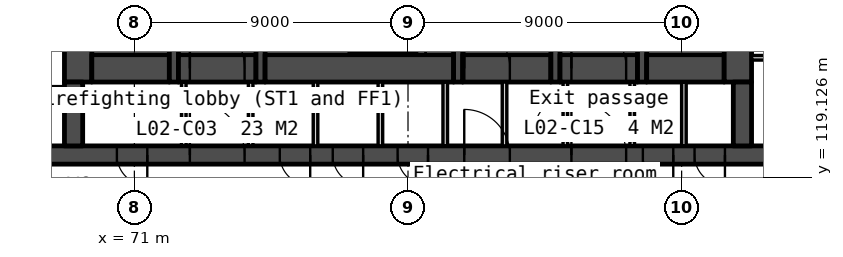
"""IFC4 building model, lengths in metres.
Left out: names, types, materials, properties, quantities, classifications, styles, units other than length and angle.
Written with IfcOpenShell. Run it as: python <this file> out.ifc"""

import sys

from ifc_helpers import new_model, si_unit, direction, frame, frame_2d, origin, place, context, subcontext, project, spatial, rectangle, extrude, element, fill, save


model = new_model("IFC4")
c1 = context("Model", 3, precision=1e-05, world=origin(), true_north=direction((0.0, 1.0)))
c2 = subcontext(c1, "Body", "Model", "MODEL_VIEW")
j1 = project(units=[si_unit("LENGTHUNIT", "METRE"), si_unit("PLANEANGLEUNIT", "RADIAN")], contexts=[c1])
p1 = place(None, origin())
s1 = spatial("IfcSite", under=j1, at=p1, CompositionType="ELEMENT")
p2 = place(p1, origin())
s2 = spatial("IfcBuilding", under=s1, at=p2, CompositionType="ELEMENT")
p3 = place(p2, frame((0.0, 0.0, 13.5)))
s3 = spatial("IfcBuildingStorey", under=s2, at=p3, CompositionType="ELEMENT", Elevation=13.5)
p4 = place(p3, frame((66.0, 119.85, 0.0), z_axis=(0.0, 0.0, 1.0), x_axis=(1.0, 0.0, 0.0)))
e1 = element("IfcWall", 1, at=p4, inside=s3, PredefinedType="SOLIDWALL", context=c2, shape_type="SweptSolid", body=[
    extrude(rectangle(XDim=28.0, YDim=0.6, at=frame_2d((14.0, 0.0))), origin(), (0.0, 0.0, 1.0), 5.75),
])
p5 = place(p4, frame((6.825, 0.0, 0.0)))
e2 = element("IfcOpeningElement", 2, at=p5, cuts=e1, PredefinedType="OPENING", context=c2, shape_type="SweptSolid", body=[
    extrude(rectangle(XDim=1.8, YDim=2.1, at=frame_2d((0.9, 1.05))), frame((0.0, 0.31, 0.0), z_axis=(0.0, -1.0, 0.0), x_axis=(1.0, 0.0, 0.0)), (0.0, 0.0, 1.0), 0.62),
])
p6 = place(p4, frame((15.85, 0.0, 0.0)))
e3 = element("IfcOpeningElement", 3, at=p6, cuts=e1, PredefinedType="OPENING", context=c2, shape_type="SweptSolid", body=[
    extrude(rectangle(XDim=1.5, YDim=2.1, at=frame_2d((0.75, 1.05))), frame((0.0, 0.31, 0.0), z_axis=(0.0, -1.0, 0.0), x_axis=(1.0, 0.0, 0.0)), (0.0, 0.0, 1.0), 0.62),
])
p7 = place(p4, frame((19.375, 0.0, 0.0)))
e4 = element("IfcOpeningElement", 4, at=p7, cuts=e1, PredefinedType="OPENING", context=c2, shape_type="SweptSolid", body=[
    extrude(rectangle(XDim=1.8, YDim=2.1, at=frame_2d((0.9, 1.05))), frame((0.0, 0.31, 0.0), z_axis=(0.0, -1.0, 0.0), x_axis=(1.0, 0.0, 0.0)), (0.0, 0.0, 1.0), 0.62),
])
p8 = place(p4, frame((4.425, 0.0, 0.0)))
e5 = element("IfcOpeningElement", 5, at=p8, cuts=e1, PredefinedType="OPENING", context=c2, shape_type="SweptSolid", body=[
    extrude(rectangle(XDim=1.0, YDim=2.1, at=frame_2d((0.5, 1.05))), frame((0.0, 0.31, 0.0), z_axis=(0.0, -1.0, 0.0), x_axis=(1.0, 0.0, 0.0)), (0.0, 0.0, 1.0), 0.62),
])
p9 = place(p4, frame((9.783, 0.0, 0.0)))
e6 = element("IfcOpeningElement", 6, at=p9, cuts=e1, PredefinedType="OPENING", context=c2, shape_type="SweptSolid", body=[
    extrude(rectangle(XDim=1.0, YDim=2.1, at=frame_2d((0.5, 1.05))), frame((0.0, 0.31, 0.0), z_axis=(0.0, -1.0, 0.0), x_axis=(1.0, 0.0, 0.0)), (0.0, 0.0, 1.0), 0.62),
])
p10 = place(p4, frame((11.525, 0.0, 0.0)))
e7 = element("IfcOpeningElement", 7, at=p10, cuts=e1, PredefinedType="OPENING", context=c2, shape_type="SweptSolid", body=[
    extrude(rectangle(XDim=1.0, YDim=2.1, at=frame_2d((0.5, 1.05))), frame((0.0, 0.31, 0.0), z_axis=(0.0, -1.0, 0.0), x_axis=(1.0, 0.0, 0.0)), (0.0, 0.0, 1.0), 0.62),
])
p11 = place(p4, frame((13.658, 0.0, 0.0)))
e8 = element("IfcOpeningElement", 8, at=p11, cuts=e1, PredefinedType="OPENING", context=c2, shape_type="SweptSolid", body=[
    extrude(rectangle(XDim=1.0, YDim=2.1, at=frame_2d((0.5, 1.05))), frame((0.0, 0.31, 0.0), z_axis=(0.0, -1.0, 0.0), x_axis=(1.0, 0.0, 0.0)), (0.0, 0.0, 1.0), 0.62),
])
p12 = place(p4, frame((21.725, 0.0, 0.0)))
e9 = element("IfcOpeningElement", 9, at=p12, cuts=e1, PredefinedType="OPENING", context=c2, shape_type="SweptSolid", body=[
    extrude(rectangle(XDim=1.0, YDim=2.1, at=frame_2d((0.5, 1.05))), frame((0.0, 0.31, 0.0), z_axis=(0.0, -1.0, 0.0), x_axis=(1.0, 0.0, 0.0)), (0.0, 0.0, 1.0), 0.62),
])
p13 = place(p4, frame((23.425, 0.0, 0.0)))
e10 = element("IfcOpeningElement", 10, at=p13, cuts=e1, PredefinedType="OPENING", context=c2, shape_type="SweptSolid", body=[
    extrude(rectangle(XDim=1.0, YDim=2.1, at=frame_2d((0.5, 1.05))), frame((0.0, 0.31, 0.0), z_axis=(0.0, -1.0, 0.0), x_axis=(1.0, 0.0, 0.0)), (0.0, 0.0, 1.0), 0.62),
])
p14 = place(p3, frame((66.6, 122.025, 0.0), z_axis=(0.0, 0.0, 1.0), x_axis=(1.0, 0.0, 0.0)))
e11 = element("IfcWall", 11, at=p14, inside=s3, PredefinedType="PARTITIONING", context=c2, shape_type="SweptSolid", body=[
    extrude(rectangle(XDim=2.1, YDim=0.15, at=frame_2d((1.05, 0.0))), origin(), (0.0, 0.0, 1.0), 5.75),
])
p15 = place(p3, frame((69.15, 133.95, 0.0), z_axis=(0.0, 0.0, 1.0), x_axis=(0.0, -1.0, 0.0)))
e12 = element("IfcWall", 12, at=p15, inside=s3, PredefinedType="SOLIDWALL", context=c2, shape_type="SweptSolid", body=[
    extrude(rectangle(XDim=11.7, YDim=0.9, at=frame_2d((5.85, 0.0))), origin(), (0.0, 0.0, 1.0), 5.75),
])
p16 = place(p3, frame((69.0, 122.25, 0.0), z_axis=(0.0, 0.0, 1.0), x_axis=(0.0, -1.0, 0.0)))
e13 = element("IfcWall", 13, at=p16, inside=s3, PredefinedType="SOLIDWALL", context=c2, shape_type="SweptSolid", body=[
    extrude(rectangle(XDim=2.1, YDim=0.6, at=frame_2d((1.05, 0.0))), origin(), (0.0, 0.0, 1.0), 5.75),
])
p17 = place(p3, frame((69.6, 122.7, 0.0), z_axis=(0.0, 0.0, 1.0), x_axis=(1.0, 0.0, 0.0)))
e14 = element("IfcWall", 14, at=p17, inside=s3, PredefinedType="SOLIDWALL", context=c2, shape_type="SweptSolid", body=[
    extrude(rectangle(XDim=2.55, YDim=0.9, at=frame_2d((1.275, 0.0))), origin(), (0.0, 0.0, 1.0), 5.75),
])
p18 = place(p3, frame((72.3, 133.95, 0.0), z_axis=(0.0, 0.0, 1.0), x_axis=(0.0, -1.0, 0.0)))
e15 = element("IfcWall", 15, at=p18, inside=s3, PredefinedType="SOLIDWALL", context=c2, shape_type="SweptSolid", body=[
    extrude(rectangle(XDim=11.7, YDim=0.3, at=frame_2d((5.85, 0.0))), origin(), (0.0, 0.0, 1.0), 5.75),
])
p19 = place(p18, frame((6.95, 0.0, 0.0)))
e16 = element("IfcOpeningElement", 16, at=p19, cuts=e15, PredefinedType="OPENING", context=c2, shape_type="SweptSolid", body=[
    extrude(rectangle(XDim=1.1, YDim=2.1, at=frame_2d((0.55, 1.05))), frame((0.0, 0.16, 0.0), z_axis=(0.0, -1.0, 0.0), x_axis=(1.0, 0.0, 0.0)), (0.0, 0.0, 1.0), 0.32),
])
p20 = place(p18, frame((9.35, 0.0, 0.0)))
e17 = element("IfcOpeningElement", 17, at=p20, cuts=e15, PredefinedType="OPENING", context=c2, shape_type="SweptSolid", body=[
    extrude(rectangle(XDim=0.9, YDim=2.1, at=frame_2d((0.45, 1.05))), frame((0.0, 0.16, 0.0), z_axis=(0.0, -1.0, 0.0), x_axis=(1.0, 0.0, 0.0)), (0.0, 0.0, 1.0), 0.32),
])
p21 = place(p18, frame((5.1, 0.0, 0.0)))
e18 = element("IfcOpeningElement", 18, at=p21, cuts=e15, PredefinedType="OPENING", context=c2, shape_type="SweptSolid", body=[
    extrude(rectangle(XDim=1.0, YDim=2.1, at=frame_2d((0.5, 1.05))), frame((0.0, 0.16, 0.0), z_axis=(0.0, -1.0, 0.0), x_axis=(1.0, 0.0, 0.0)), (0.0, 0.0, 1.0), 0.32),
])
p22 = place(p3, frame((72.45, 122.7, 0.0), z_axis=(0.0, 0.0, 1.0), x_axis=(1.0, 0.0, 0.0)))
e19 = element("IfcWall", 19, at=p22, inside=s3, PredefinedType="SOLIDWALL", context=c2, shape_type="SweptSolid", body=[
    extrude(rectangle(XDim=2.55, YDim=0.9, at=frame_2d((1.275, 0.0))), origin(), (0.0, 0.0, 1.0), 5.75),
])
p23 = place(p22, frame((0.375, 0.0, 0.0)))
e20 = element("IfcOpeningElement", 20, at=p23, cuts=e19, PredefinedType="OPENING", context=c2, shape_type="SweptSolid", body=[
    extrude(rectangle(XDim=1.8, YDim=2.1, at=frame_2d((0.9, 1.05))), frame((0.0, 0.46, 0.0), z_axis=(0.0, -1.0, 0.0), x_axis=(1.0, 0.0, 0.0)), (0.0, 0.0, 1.0), 0.92),
])
for number, where, z_axis, x_axis in (
    (21, (72.625, 122.25, 0.0), (0.0, 0.0, 1.0), (0.0, -1.0, 0.0)),
    (22, (74.825, 122.25, 0.0), (0.0, 0.0, 1.0), (0.0, -1.0, 0.0)),
):
    element("IfcWall", number, at=place(p3, frame(where, z_axis=z_axis, x_axis=x_axis)), inside=s3, PredefinedType="PARTITIONING", context=c2, shape_type="SweptSolid", body=[
        extrude(rectangle(XDim=2.1, YDim=0.15, at=frame_2d((1.05, 0.0))), origin(), (0.0, 0.0, 1.0), 5.75),
    ])
p24 = place(p3, frame((75.15, 133.95, 0.0), z_axis=(0.0, 0.0, 1.0), x_axis=(0.0, -1.0, 0.0)))
e23 = element("IfcWall", 23, at=p24, inside=s3, PredefinedType="SOLIDWALL", context=c2, shape_type="SweptSolid", body=[
    extrude(rectangle(XDim=11.7, YDim=0.3, at=frame_2d((5.85, 0.0))), origin(), (0.0, 0.0, 1.0), 5.75),
])
p25 = place(p3, frame((75.3, 122.7, 0.0), z_axis=(0.0, 0.0, 1.0), x_axis=(1.0, 0.0, 0.0)))
e24 = element("IfcWall", 24, at=p25, inside=s3, PredefinedType="SOLIDWALL", context=c2, shape_type="SweptSolid", body=[
    extrude(rectangle(XDim=6.2, YDim=0.9, at=frame_2d((3.1, 0.0))), origin(), (0.0, 0.0, 1.0), 5.75),
])
for number, where, z_axis, x_axis in (
    (25, (76.958, 122.25, 0.0), (0.0, 0.0, 1.0), (0.0, -1.0, 0.0)),
    (26, (79.092, 122.25, 0.0), (0.0, 0.0, 1.0), (0.0, -1.0, 0.0)),
    (27, (81.225, 122.25, 0.0), (0.0, 0.0, 1.0), (0.0, -1.0, 0.0)),
):
    element("IfcWall", number, at=place(p3, frame(where, z_axis=z_axis, x_axis=x_axis)), inside=s3, PredefinedType="PARTITIONING", context=c2, shape_type="SweptSolid", body=[
        extrude(rectangle(XDim=2.1, YDim=0.15, at=frame_2d((1.05, 0.0))), origin(), (0.0, 0.0, 1.0), 5.75),
    ])
p26 = place(p3, frame((81.65, 125.7, 0.0), z_axis=(0.0, 0.0, 1.0), x_axis=(0.0, -1.0, 0.0)))
e28 = element("IfcWall", 28, at=p26, inside=s3, PredefinedType="SOLIDWALL", context=c2, shape_type="SweptSolid", body=[
    extrude(rectangle(XDim=3.45, YDim=0.3, at=frame_2d((1.725, 0.0))), origin(), (0.0, 0.0, 1.0), 5.75),
])
p27 = place(p26, frame((0.75, 0.0, 0.0)))
e29 = element("IfcOpeningElement", 29, at=p27, cuts=e28, PredefinedType="OPENING", context=c2, shape_type="SweptSolid", body=[
    extrude(rectangle(XDim=1.0, YDim=2.1, at=frame_2d((0.5, 1.05))), frame((0.0, 0.16, 0.0), z_axis=(0.0, -1.0, 0.0), x_axis=(1.0, 0.0, 0.0)), (0.0, 0.0, 1.0), 0.32),
])
p28 = place(p3, frame((81.8, 122.7, 0.0), z_axis=(0.0, 0.0, 1.0), x_axis=(1.0, 0.0, 0.0)))
e30 = element("IfcWall", 30, at=p28, inside=s3, PredefinedType="SOLIDWALL", context=c2, shape_type="SweptSolid", body=[
    extrude(rectangle(XDim=2.9, YDim=0.9, at=frame_2d((1.45, 0.0))), origin(), (0.0, 0.0, 1.0), 5.75),
])
p29 = place(p28, frame((0.05, 0.0, 0.0)))
e31 = element("IfcOpeningElement", 31, at=p29, cuts=e30, PredefinedType="OPENING", context=c2, shape_type="SweptSolid", body=[
    extrude(rectangle(XDim=1.5, YDim=2.1, at=frame_2d((0.75, 1.05))), frame((0.0, 0.46, 0.0), z_axis=(0.0, -1.0, 0.0), x_axis=(1.0, 0.0, 0.0)), (0.0, 0.0, 1.0), 0.92),
])
p30 = place(p3, frame((83.175, 122.25, 0.0), z_axis=(0.0, 0.0, 1.0), x_axis=(0.0, -1.0, 0.0)))
e32 = element("IfcWall", 32, at=p30, inside=s3, PredefinedType="PARTITIONING", context=c2, shape_type="SweptSolid", body=[
    extrude(rectangle(XDim=2.1, YDim=0.15, at=frame_2d((1.05, 0.0))), origin(), (0.0, 0.0, 1.0), 5.75),
])
p31 = place(p3, frame((84.85, 133.95, 0.0), z_axis=(0.0, 0.0, 1.0), x_axis=(0.0, -1.0, 0.0)))
e33 = element("IfcWall", 33, at=p31, inside=s3, PredefinedType="SOLIDWALL", context=c2, shape_type="SweptSolid", body=[
    extrude(rectangle(XDim=11.7, YDim=0.3, at=frame_2d((5.85, 0.0))), origin(), (0.0, 0.0, 1.0), 5.75),
])
p32 = place(p3, frame((85.0, 122.7, 0.0), z_axis=(0.0, 0.0, 1.0), x_axis=(1.0, 0.0, 0.0)))
e34 = element("IfcWall", 34, at=p32, inside=s3, PredefinedType="SOLIDWALL", context=c2, shape_type="SweptSolid", body=[
    extrude(rectangle(XDim=2.55, YDim=0.9, at=frame_2d((1.275, 0.0))), origin(), (0.0, 0.0, 1.0), 5.75),
])
p33 = place(p32, frame((0.375, 0.0, 0.0)))
e35 = element("IfcOpeningElement", 35, at=p33, cuts=e34, PredefinedType="OPENING", context=c2, shape_type="SweptSolid", body=[
    extrude(rectangle(XDim=1.8, YDim=2.1, at=frame_2d((0.9, 1.05))), frame((0.0, 0.46, 0.0), z_axis=(0.0, -1.0, 0.0), x_axis=(1.0, 0.0, 0.0)), (0.0, 0.0, 1.0), 0.92),
])
p34 = place(p3, frame((85.175, 122.25, 0.0), z_axis=(0.0, 0.0, 1.0), x_axis=(0.0, -1.0, 0.0)))
e36 = element("IfcWall", 36, at=p34, inside=s3, PredefinedType="PARTITIONING", context=c2, shape_type="SweptSolid", body=[
    extrude(rectangle(XDim=2.1, YDim=0.15, at=frame_2d((1.05, 0.0))), origin(), (0.0, 0.0, 1.0), 5.75),
])
p35 = place(p34, frame((0.55, 0.0, 0.0)))
e37 = element("IfcOpeningElement", 37, at=p35, cuts=e36, PredefinedType="OPENING", context=c2, shape_type="SweptSolid", body=[
    extrude(rectangle(XDim=1.0, YDim=2.1, at=frame_2d((0.5, 1.05))), frame((0.0, 0.085, 0.0), z_axis=(0.0, -1.0, 0.0), x_axis=(1.0, 0.0, 0.0)), (0.0, 0.0, 1.0), 0.17),
])
p36 = place(p3, frame((87.375, 122.25, 0.0), z_axis=(0.0, 0.0, 1.0), x_axis=(0.0, -1.0, 0.0)))
e38 = element("IfcWall", 38, at=p36, inside=s3, PredefinedType="PARTITIONING", context=c2, shape_type="SweptSolid", body=[
    extrude(rectangle(XDim=2.1, YDim=0.15, at=frame_2d((1.05, 0.0))), origin(), (0.0, 0.0, 1.0), 5.75),
])
p37 = place(p3, frame((87.7, 133.95, 0.0), z_axis=(0.0, 0.0, 1.0), x_axis=(0.0, -1.0, 0.0)))
e39 = element("IfcWall", 39, at=p37, inside=s3, PredefinedType="SOLIDWALL", context=c2, shape_type="SweptSolid", body=[
    extrude(rectangle(XDim=11.7, YDim=0.3, at=frame_2d((5.85, 0.0))), origin(), (0.0, 0.0, 1.0), 5.75),
])
p38 = place(p37, frame((6.95, 0.0, 0.0)))
e40 = element("IfcOpeningElement", 40, at=p38, cuts=e39, PredefinedType="OPENING", context=c2, shape_type="SweptSolid", body=[
    extrude(rectangle(XDim=1.1, YDim=2.1, at=frame_2d((0.55, 1.05))), frame((0.0, 0.16, 0.0), z_axis=(0.0, -1.0, 0.0), x_axis=(1.0, 0.0, 0.0)), (0.0, 0.0, 1.0), 0.32),
])
p39 = place(p37, frame((5.1, 0.0, 0.0)))
e41 = element("IfcOpeningElement", 41, at=p39, cuts=e39, PredefinedType="OPENING", context=c2, shape_type="SweptSolid", body=[
    extrude(rectangle(XDim=1.0, YDim=2.1, at=frame_2d((0.5, 1.05))), frame((0.0, 0.16, 0.0), z_axis=(0.0, -1.0, 0.0), x_axis=(1.0, 0.0, 0.0)), (0.0, 0.0, 1.0), 0.32),
])
p40 = place(p37, frame((9.25, 0.0, 0.0)))
e42 = element("IfcOpeningElement", 42, at=p40, cuts=e39, PredefinedType="OPENING", context=c2, shape_type="SweptSolid", body=[
    extrude(rectangle(XDim=1.1, YDim=2.1, at=frame_2d((0.55, 1.05))), frame((0.0, 0.16, 0.0), z_axis=(0.0, -1.0, 0.0), x_axis=(1.0, 0.0, 0.0)), (0.0, 0.0, 1.0), 0.32),
])
p41 = place(p3, frame((87.85, 122.7, 0.0), z_axis=(0.0, 0.0, 1.0), x_axis=(1.0, 0.0, 0.0)))
e43 = element("IfcWall", 43, at=p41, inside=s3, PredefinedType="SOLIDWALL", context=c2, shape_type="SweptSolid", body=[
    extrude(rectangle(XDim=2.55, YDim=0.9, at=frame_2d((1.275, 0.0))), origin(), (0.0, 0.0, 1.0), 5.75),
])
p42 = place(p3, frame((89.075, 122.25, 0.0), z_axis=(0.0, 0.0, 1.0), x_axis=(0.0, -1.0, 0.0)))
e44 = element("IfcWall", 44, at=p42, inside=s3, PredefinedType="PARTITIONING", context=c2, shape_type="SweptSolid", body=[
    extrude(rectangle(XDim=2.1, YDim=0.15, at=frame_2d((1.05, 0.0))), origin(), (0.0, 0.0, 1.0), 5.75),
])
p43 = place(p3, frame((90.85, 133.95, 0.0), z_axis=(0.0, 0.0, 1.0), x_axis=(0.0, -1.0, 0.0)))
e45 = element("IfcWall", 45, at=p43, inside=s3, PredefinedType="SOLIDWALL", context=c2, shape_type="SweptSolid", body=[
    extrude(rectangle(XDim=11.7, YDim=0.9, at=frame_2d((5.85, 0.0))), origin(), (0.0, 0.0, 1.0), 5.75),
])
p44 = place(p3, frame((91.0, 122.25, 0.0), z_axis=(0.0, 0.0, 1.0), x_axis=(0.0, -1.0, 0.0)))
e46 = element("IfcWall", 46, at=p44, inside=s3, PredefinedType="SOLIDWALL", context=c2, shape_type="SweptSolid", body=[
    extrude(rectangle(XDim=2.1, YDim=0.6, at=frame_2d((1.05, 0.0))), origin(), (0.0, 0.0, 1.0), 5.75),
])
p45 = place(p3, frame((91.3, 123.049, 0.0), z_axis=(0.0, 0.0, 1.0), x_axis=(1.0, 0.0, 0.0)))
e47 = element("IfcWall", 47, at=p45, inside=s3, PredefinedType="PARTITIONING", context=c2, shape_type="SweptSolid", body=[
    extrude(rectangle(XDim=2.1, YDim=0.15, at=frame_2d((1.05, 0.0))), origin(), (0.0, 0.0, 1.0), 5.75),
])
for number, where, z_axis, x_axis in (
    (48, (133.302, 129.091, 0.0), (0.0, 0.0, 1.0), (-0.5, -0.866, 0.0)),
    (49, (77.166, 41.679, 0.0), (0.0, 0.0, 1.0), (-0.5, 0.866, 0.0)),
):
    element("IfcWall", number, at=place(p3, frame(where, z_axis=z_axis, x_axis=x_axis)), inside=s3, PredefinedType="STANDARD", context=c2, shape_type="SweptSolid", body=[
        extrude(rectangle(XDim=100.935, YDim=1.0, at=frame_2d((50.467, 0.0))), origin(), (0.0, 0.0, 1.0), 0.6),
    ])
p46 = place(p33, origin())
e50 = element("IfcDoor", 50, at=p46, inside=s3, OperationType="DOUBLE_DOOR_DOUBLE_SWING", PredefinedType="DOOR", context=c2, shape_type="SweptSolid", body=[
    extrude(rectangle(XDim=1.8, YDim=2.1, at=frame_2d((0.9, 1.05))), frame((0.0, 0.025, 0.0), z_axis=(0.0, -1.0, 0.0), x_axis=(1.0, 0.0, 0.0)), (0.0, 0.0, 1.0), 0.05),
])
fill(e35, e50)
p47 = place(p23, origin())
e51 = element("IfcDoor", 51, at=p47, inside=s3, OperationType="DOUBLE_DOOR_DOUBLE_SWING", PredefinedType="DOOR", context=c2, shape_type="SweptSolid", body=[
    extrude(rectangle(XDim=1.8, YDim=2.1, at=frame_2d((0.9, 1.05))), frame((0.0, 0.025, 0.0), z_axis=(0.0, -1.0, 0.0), x_axis=(1.0, 0.0, 0.0)), (0.0, 0.0, 1.0), 0.05),
])
fill(e20, e51)
p48 = place(p29, origin())
e52 = element("IfcDoor", 52, at=p48, inside=s3, OperationType="DOUBLE_DOOR_DOUBLE_SWING", PredefinedType="DOOR", context=c2, shape_type="SweptSolid", body=[
    extrude(rectangle(XDim=1.5, YDim=2.1, at=frame_2d((0.75, 1.05))), frame((0.0, 0.025, 0.0), z_axis=(0.0, -1.0, 0.0), x_axis=(1.0, 0.0, 0.0)), (0.0, 0.0, 1.0), 0.05),
])
fill(e31, e52)
p49 = place(p5, origin())
e53 = element("IfcDoor", 53, at=p49, inside=s3, OperationType="DOUBLE_DOOR_DOUBLE_SWING", PredefinedType="DOOR", context=c2, shape_type="SweptSolid", body=[
    extrude(rectangle(XDim=1.8, YDim=2.1, at=frame_2d((0.9, 1.05))), frame((0.0, 0.025, 0.0), z_axis=(0.0, -1.0, 0.0), x_axis=(1.0, 0.0, 0.0)), (0.0, 0.0, 1.0), 0.05),
])
fill(e2, e53)
p50 = place(p6, origin())
e54 = element("IfcDoor", 54, at=p50, inside=s3, OperationType="DOUBLE_DOOR_DOUBLE_SWING", PredefinedType="DOOR", context=c2, shape_type="SweptSolid", body=[
    extrude(rectangle(XDim=1.5, YDim=2.1, at=frame_2d((0.75, 1.05))), frame((0.0, 0.025, 0.0), z_axis=(0.0, -1.0, 0.0), x_axis=(1.0, 0.0, 0.0)), (0.0, 0.0, 1.0), 0.05),
])
fill(e3, e54)
p51 = place(p7, origin())
e55 = element("IfcDoor", 55, at=p51, inside=s3, OperationType="DOUBLE_DOOR_DOUBLE_SWING", PredefinedType="DOOR", context=c2, shape_type="SweptSolid", body=[
    extrude(rectangle(XDim=1.8, YDim=2.1, at=frame_2d((0.9, 1.05))), frame((0.0, 0.025, 0.0), z_axis=(0.0, -1.0, 0.0), x_axis=(1.0, 0.0, 0.0)), (0.0, 0.0, 1.0), 0.05),
])
fill(e4, e55)
p52 = place(p8, origin())
e56 = element("IfcDoor", 56, at=p52, inside=s3, OperationType="SINGLE_SWING_RIGHT", PredefinedType="DOOR", context=c2, shape_type="SweptSolid", body=[
    extrude(rectangle(XDim=1.0, YDim=2.1, at=frame_2d((0.5, 1.05))), frame((0.0, 0.025, 0.0), z_axis=(0.0, -1.0, 0.0), x_axis=(1.0, 0.0, 0.0)), (0.0, 0.0, 1.0), 0.05),
])
fill(e5, e56)
p53 = place(p9, origin())
e57 = element("IfcDoor", 57, at=p53, inside=s3, OperationType="SINGLE_SWING_RIGHT", PredefinedType="DOOR", context=c2, shape_type="SweptSolid", body=[
    extrude(rectangle(XDim=1.0, YDim=2.1, at=frame_2d((0.5, 1.05))), frame((0.0, 0.025, 0.0), z_axis=(0.0, -1.0, 0.0), x_axis=(1.0, 0.0, 0.0)), (0.0, 0.0, 1.0), 0.05),
])
fill(e6, e57)
p54 = place(p10, origin())
e58 = element("IfcDoor", 58, at=p54, inside=s3, OperationType="SINGLE_SWING_RIGHT", PredefinedType="DOOR", context=c2, shape_type="SweptSolid", body=[
    extrude(rectangle(XDim=1.0, YDim=2.1, at=frame_2d((0.5, 1.05))), frame((0.0, 0.025, 0.0), z_axis=(0.0, -1.0, 0.0), x_axis=(1.0, 0.0, 0.0)), (0.0, 0.0, 1.0), 0.05),
])
fill(e7, e58)
p55 = place(p11, origin())
e59 = element("IfcDoor", 59, at=p55, inside=s3, OperationType="SINGLE_SWING_RIGHT", PredefinedType="DOOR", context=c2, shape_type="SweptSolid", body=[
    extrude(rectangle(XDim=1.0, YDim=2.1, at=frame_2d((0.5, 1.05))), frame((0.0, 0.025, 0.0), z_axis=(0.0, -1.0, 0.0), x_axis=(1.0, 0.0, 0.0)), (0.0, 0.0, 1.0), 0.05),
])
fill(e8, e59)
p56 = place(p35, origin())
e60 = element("IfcDoor", 60, at=p56, inside=s3, OperationType="SINGLE_SWING_RIGHT", PredefinedType="DOOR", context=c2, shape_type="SweptSolid", body=[
    extrude(rectangle(XDim=1.0, YDim=2.1, at=frame_2d((0.5, 1.05))), frame((0.0, 0.025, 0.0), z_axis=(0.0, -1.0, 0.0), x_axis=(1.0, 0.0, 0.0)), (0.0, 0.0, 1.0), 0.05),
])
fill(e37, e60)
p57 = place(p12, origin())
e61 = element("IfcDoor", 61, at=p57, inside=s3, OperationType="SINGLE_SWING_RIGHT", PredefinedType="DOOR", context=c2, shape_type="SweptSolid", body=[
    extrude(rectangle(XDim=1.0, YDim=2.1, at=frame_2d((0.5, 1.05))), frame((0.0, 0.025, 0.0), z_axis=(0.0, -1.0, 0.0), x_axis=(1.0, 0.0, 0.0)), (0.0, 0.0, 1.0), 0.05),
])
fill(e9, e61)
p58 = place(p13, origin())
e62 = element("IfcDoor", 62, at=p58, inside=s3, OperationType="SINGLE_SWING_RIGHT", PredefinedType="DOOR", context=c2, shape_type="SweptSolid", body=[
    extrude(rectangle(XDim=1.0, YDim=2.1, at=frame_2d((0.5, 1.05))), frame((0.0, 0.025, 0.0), z_axis=(0.0, -1.0, 0.0), x_axis=(1.0, 0.0, 0.0)), (0.0, 0.0, 1.0), 0.05),
])
fill(e10, e62)
save(model, sys.argv[1])
